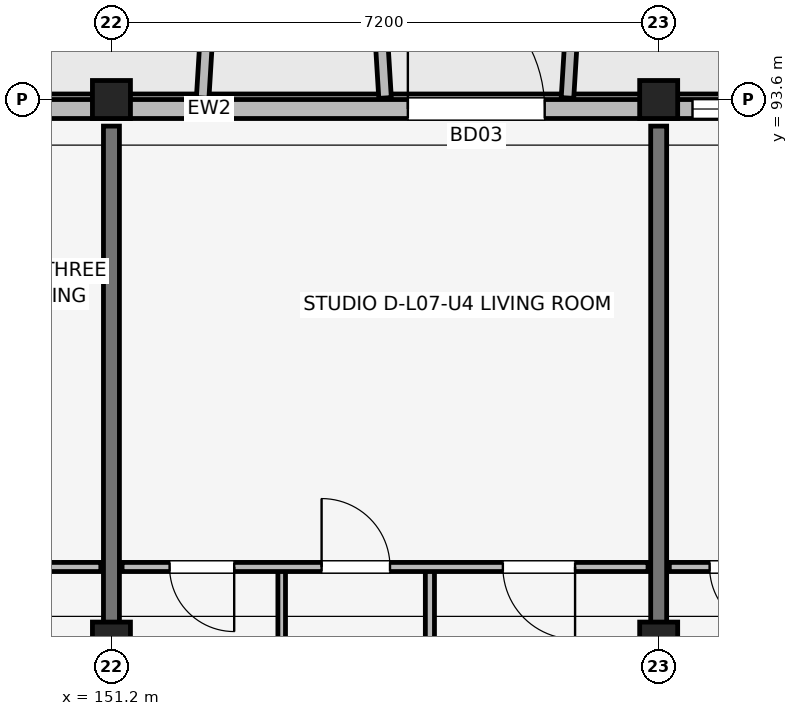
"""IFC4 building model, lengths in metres.
Left out: names, types, materials, properties, quantities, classifications, styles, units other than length and angle.
Written with IfcOpenShell. Run it as: python <this file> out.ifc"""

import sys

from ifc_helpers import new_model, si_unit, direction, frame, frame_2d, origin, origin_2d, place, context, subcontext, project, spatial, rectangle, extrude, element, fill, save


model = new_model("IFC4")
c1 = context("Model", 3, precision=1e-05, world=origin(), true_north=direction((0.0, 1.0)))
c2 = subcontext(c1, "Body", "Model", "MODEL_VIEW")
j1 = project(units=[si_unit("LENGTHUNIT", "METRE"), si_unit("PLANEANGLEUNIT", "RADIAN")], contexts=[c1])
p1 = place(None, origin())
s1 = spatial("IfcSite", under=j1, at=p1, CompositionType="ELEMENT")
p2 = place(p1, origin())
s2 = spatial("IfcBuilding", under=s1, at=p2, CompositionType="ELEMENT")
p3 = place(p2, frame((0.0, 0.0, 24.45)))
s3 = spatial("IfcBuildingStorey", under=s2, at=p3, CompositionType="ELEMENT", Elevation=24.45)
p4 = place(p3, frame((151.2, 86.4, 0.0), z_axis=(0.0, 0.0, 1.0), x_axis=(1.0, 0.0, 0.0)))
e1 = element("IfcColumn", 1, at=p4, inside=s3, PredefinedType="COLUMN", context=c2, shape_type="SweptSolid", body=[
    extrude(rectangle(XDim=0.5, YDim=0.65, at=origin_2d()), origin(), (0.0, 0.0, 1.0), 3.15),
])
p5 = place(p3, frame((151.2, 93.6, 0.0), z_axis=(0.0, 0.0, 1.0), x_axis=(1.0, 0.0, 0.0)))
e2 = element("IfcColumn", 2, at=p5, inside=s3, PredefinedType="COLUMN", context=c2, shape_type="SweptSolid", body=[
    extrude(rectangle(XDim=0.5, YDim=0.5, at=origin_2d()), origin(), (0.0, 0.0, 1.0), 3.15),
])
p6 = place(p3, frame((158.4, 86.4, 0.0), z_axis=(0.0, 0.0, 1.0), x_axis=(1.0, 0.0, 0.0)))
e3 = element("IfcColumn", 3, at=p6, inside=s3, PredefinedType="COLUMN", context=c2, shape_type="SweptSolid", body=[
    extrude(rectangle(XDim=0.5, YDim=0.65, at=origin_2d()), origin(), (0.0, 0.0, 1.0), 3.15),
])
p7 = place(p3, frame((158.4, 93.6, 0.0), z_axis=(0.0, 0.0, 1.0), x_axis=(1.0, 0.0, 0.0)))
e4 = element("IfcColumn", 4, at=p7, inside=s3, PredefinedType="COLUMN", context=c2, shape_type="SweptSolid", body=[
    extrude(rectangle(XDim=0.5, YDim=0.5, at=origin_2d()), origin(), (0.0, 0.0, 1.0), 3.15),
])
for number, where, z_axis, x_axis in (
    (5, (151.2, 83.85, 0.0), (0.0, 0.0, 1.0), (0.0, 1.0, 0.0)),
    (6, (158.4, 83.85, 0.0), (0.0, 0.0, 1.0), (0.0, 1.0, 0.0)),
):
    element("IfcWall", number, at=place(p3, frame(where, z_axis=z_axis, x_axis=x_axis)), inside=s3, PredefinedType="SHEAR", context=c2, shape_type="SweptSolid", body=[
        extrude(rectangle(XDim=9.4, YDim=0.21, at=frame_2d((4.7, 0.0))), origin(), (0.0, 0.0, 1.0), 3.15),
    ])
p8 = place(p3, frame((162.8, 93.475, 0.0), z_axis=(0.0, 0.0, 1.0), x_axis=(-1.0, 0.0, 0.0)))
e7 = element("IfcWall", 7, at=p8, inside=s3, PredefinedType="SOLIDWALL", context=c2, shape_type="SweptSolid", body=[
    extrude(rectangle(XDim=30.4, YDim=0.25, at=frame_2d((15.2, 0.0))), origin(), (0.0, 0.0, 1.0), 2.43),
])
p9 = place(p8, frame((21.95, 0.0, 0.0), z_axis=(0.0, 0.0, 1.0), x_axis=(-1.0, 0.0, 0.0)))
e8 = element("IfcOpeningElement", 8, at=p9, cuts=e7, PredefinedType="OPENING", context=c2, shape_type="SweptSolid", body=[
    extrude(rectangle(XDim=1.5, YDim=2.15, at=frame_2d((0.75, 1.075))), frame((0.0, 0.135, 0.0), z_axis=(0.0, -1.0, 0.0), x_axis=(1.0, 0.0, 0.0)), (0.0, 0.0, 1.0), 0.27),
])
p10 = place(p8, frame((7.7, 0.0, 0.0), z_axis=(0.0, 0.0, 1.0), x_axis=(-1.0, 0.0, 0.0)))
e9 = element("IfcOpeningElement", 9, at=p10, cuts=e7, PredefinedType="OPENING", context=c2, shape_type="SweptSolid", body=[
    extrude(rectangle(XDim=1.8, YDim=2.15, at=frame_2d((0.9, 1.075))), frame((0.0, 0.135, 0.0), z_axis=(0.0, -1.0, 0.0), x_axis=(1.0, 0.0, 0.0)), (0.0, 0.0, 1.0), 0.27),
])
p11 = place(p8, frame((27.97, 0.0, 0.7)))
e10 = element("IfcOpeningElement", 10, at=p11, cuts=e7, PredefinedType="OPENING", context=c2, shape_type="SweptSolid", body=[
    extrude(rectangle(XDim=1.46, YDim=1.55, at=frame_2d((0.73, 0.775))), frame((0.0, 0.135, 0.0), z_axis=(0.0, -1.0, 0.0), x_axis=(1.0, 0.0, 0.0)), (0.0, 0.0, 1.0), 0.27),
])
p12 = place(p8, frame((26.445, 0.0, 0.75)))
e11 = element("IfcOpeningElement", 11, at=p12, cuts=e7, PredefinedType="OPENING", context=c2, shape_type="SweptSolid", body=[
    extrude(rectangle(XDim=0.6, YDim=1.25, at=frame_2d((0.3, 0.625))), frame((0.0, 0.135, 0.0), z_axis=(0.0, -1.0, 0.0), x_axis=(1.0, 0.0, 0.0)), (0.0, 0.0, 1.0), 0.27),
])
p13 = place(p8, frame((23.925, 0.0, 0.75)))
e12 = element("IfcOpeningElement", 12, at=p13, cuts=e7, PredefinedType="OPENING", context=c2, shape_type="SweptSolid", body=[
    extrude(rectangle(XDim=0.72, YDim=1.35, at=frame_2d((0.36, 0.675))), frame((0.0, 0.135, 0.0), z_axis=(0.0, -1.0, 0.0), x_axis=(1.0, 0.0, 0.0)), (0.0, 0.0, 1.0), 0.27),
])
p14 = place(p8, frame((16.725, 0.0, 0.75)))
e13 = element("IfcOpeningElement", 13, at=p14, cuts=e7, PredefinedType="OPENING", context=c2, shape_type="SweptSolid", body=[
    extrude(rectangle(XDim=0.72, YDim=1.35, at=frame_2d((0.36, 0.675))), frame((0.0, 0.135, 0.0), z_axis=(0.0, -1.0, 0.0), x_axis=(1.0, 0.0, 0.0)), (0.0, 0.0, 1.0), 0.27),
])
p15 = place(p8, frame((12.925, 0.0, 0.67)))
e14 = element("IfcOpeningElement", 14, at=p15, cuts=e7, PredefinedType="OPENING", context=c2, shape_type="SweptSolid", body=[
    extrude(rectangle(XDim=2.15, YDim=1.65, at=frame_2d((1.075, 0.825))), frame((0.0, 0.135, 0.0), z_axis=(0.0, -1.0, 0.0), x_axis=(1.0, 0.0, 0.0)), (0.0, 0.0, 1.0), 0.27),
])
p16 = place(p8, frame((3.355, 0.0, 0.75)))
e15 = element("IfcOpeningElement", 15, at=p16, cuts=e7, PredefinedType="OPENING", context=c2, shape_type="SweptSolid", body=[
    extrude(rectangle(XDim=0.6, YDim=1.25, at=frame_2d((0.3, 0.625))), frame((0.0, 0.135, 0.0), z_axis=(0.0, -1.0, 0.0), x_axis=(1.0, 0.0, 0.0)), (0.0, 0.0, 1.0), 0.27),
])
p17 = place(p8, frame((0.96, 0.0, 0.75)))
e16 = element("IfcOpeningElement", 16, at=p17, cuts=e7, PredefinedType="OPENING", context=c2, shape_type="SweptSolid", body=[
    extrude(rectangle(XDim=1.22, YDim=1.5, at=frame_2d((0.61, 0.75))), frame((0.0, 0.135, 0.0), z_axis=(0.0, -1.0, 0.0), x_axis=(1.0, 0.0, 0.0)), (0.0, 0.0, 1.0), 0.27),
])
for number, where, z_axis, x_axis in (
    (17, (152.4, 93.62, 0.0), (0.0, 0.0, 1.0), (0.061, 0.998, 0.0)),
    (18, (154.8, 93.62, 0.0), (0.0, 0.0, 1.0), (-0.061, 0.998, 0.0)),
    (19, (157.2, 93.62, 0.0), (0.0, 0.0, 1.0), (0.061, 0.998, 0.0)),
):
    element("IfcWall", number, at=place(p3, frame(where, z_axis=z_axis, x_axis=x_axis)), inside=s3, PredefinedType="ELEMENTEDWALL", context=c2, shape_type="SweptSolid", body=[
        extrude(rectangle(XDim=1.964, YDim=0.165, at=frame_2d((0.982, 0.0))), origin(), (0.0, 0.0, 1.0), 2.53),
    ])
p18 = place(p3, frame((144.14, 87.45, 0.0), z_axis=(0.0, 0.0, 1.0), x_axis=(1.0, 0.0, 0.0)))
e20 = element("IfcWall", 20, at=p18, inside=s3, PredefinedType="PARTITIONING", context=c2, shape_type="SweptSolid", body=[
    extrude(rectangle(XDim=6.92, YDim=0.12, at=frame_2d((3.46, 0.0))), origin(), (0.0, 0.0, 1.0), 2.38),
])
p19 = place(p18, frame((0.625, 0.0, 0.0)))
e21 = element("IfcOpeningElement", 21, at=p19, cuts=e20, PredefinedType="OPENING", context=c2, shape_type="SweptSolid", body=[
    extrude(rectangle(XDim=0.85, YDim=2.08, at=frame_2d((0.425, 1.04))), frame((0.0, 0.07, 0.0), z_axis=(0.0, -1.0, 0.0), x_axis=(1.0, 0.0, 0.0)), (0.0, 0.0, 1.0), 0.14),
])
p20 = place(p18, frame((3.675, 0.0, 0.0), z_axis=(0.0, 0.0, 1.0), x_axis=(-1.0, 0.0, 0.0)))
e22 = element("IfcOpeningElement", 22, at=p20, cuts=e20, PredefinedType="OPENING", context=c2, shape_type="SweptSolid", body=[
    extrude(rectangle(XDim=0.9, YDim=2.08, at=frame_2d((0.45, 1.04))), frame((0.0, 0.07, 0.0), z_axis=(0.0, -1.0, 0.0), x_axis=(1.0, 0.0, 0.0)), (0.0, 0.0, 1.0), 0.14),
])
p21 = place(p18, frame((5.16, 0.0, 0.0)))
e23 = element("IfcOpeningElement", 23, at=p21, cuts=e20, PredefinedType="OPENING", context=c2, shape_type="SweptSolid", body=[
    extrude(rectangle(XDim=0.95, YDim=2.08, at=frame_2d((0.475, 1.04))), frame((0.0, 0.07, 0.0), z_axis=(0.0, -1.0, 0.0), x_axis=(1.0, 0.0, 0.0)), (0.0, 0.0, 1.0), 0.14),
])
p22 = place(p3, frame((153.44, 83.7, 0.0), z_axis=(0.0, 0.0, 1.0), x_axis=(0.0, 1.0, 0.0)))
e24 = element("IfcWall", 24, at=p22, inside=s3, PredefinedType="PARTITIONING", context=c2, shape_type="SweptSolid", body=[
    extrude(rectangle(XDim=3.75, YDim=0.1, at=frame_2d((1.875, 0.0))), origin(), (0.0, 0.0, 1.0), 2.38),
])
p23 = place(p3, frame((155.39, 83.7, 0.0), z_axis=(0.0, 0.0, 1.0), x_axis=(0.0, 1.0, 0.0)))
e25 = element("IfcWall", 25, at=p23, inside=s3, PredefinedType="PARTITIONING", context=c2, shape_type="SweptSolid", body=[
    extrude(rectangle(XDim=3.75, YDim=0.12, at=frame_2d((1.875, 0.0))), origin(), (0.0, 0.0, 1.0), 2.38),
])
p24 = place(p3, frame((151.34, 87.45, 0.0), z_axis=(0.0, 0.0, 1.0), x_axis=(1.0, 0.0, 0.0)))
e26 = element("IfcWall", 26, at=p24, inside=s3, PredefinedType="PARTITIONING", context=c2, shape_type="SweptSolid", body=[
    extrude(rectangle(XDim=6.92, YDim=0.12, at=frame_2d((3.46, 0.0))), origin(), (0.0, 0.0, 1.0), 2.38),
])
p25 = place(p24, frame((1.475, 0.0, 0.0), z_axis=(0.0, 0.0, 1.0), x_axis=(-1.0, 0.0, 0.0)))
e27 = element("IfcOpeningElement", 27, at=p25, cuts=e26, PredefinedType="OPENING", context=c2, shape_type="SweptSolid", body=[
    extrude(rectangle(XDim=0.85, YDim=2.08, at=frame_2d((0.425, 1.04))), frame((0.0, 0.07, 0.0), z_axis=(0.0, -1.0, 0.0), x_axis=(1.0, 0.0, 0.0)), (0.0, 0.0, 1.0), 0.14),
])
p26 = place(p24, frame((2.625, 0.0, 0.0)))
e28 = element("IfcOpeningElement", 28, at=p26, cuts=e26, PredefinedType="OPENING", context=c2, shape_type="SweptSolid", body=[
    extrude(rectangle(XDim=0.9, YDim=2.08, at=frame_2d((0.45, 1.04))), frame((0.0, 0.07, 0.0), z_axis=(0.0, -1.0, 0.0), x_axis=(1.0, 0.0, 0.0)), (0.0, 0.0, 1.0), 0.14),
])
p27 = place(p24, frame((5.96, 0.0, 0.0), z_axis=(0.0, 0.0, 1.0), x_axis=(-1.0, 0.0, 0.0)))
e29 = element("IfcOpeningElement", 29, at=p27, cuts=e26, PredefinedType="OPENING", context=c2, shape_type="SweptSolid", body=[
    extrude(rectangle(XDim=0.95, YDim=2.08, at=frame_2d((0.475, 1.04))), frame((0.0, 0.07, 0.0), z_axis=(0.0, -1.0, 0.0), x_axis=(1.0, 0.0, 0.0)), (0.0, 0.0, 1.0), 0.14),
])
p28 = place(p3, frame((158.54, 87.45, 0.0), z_axis=(0.0, 0.0, 1.0), x_axis=(1.0, 0.0, 0.0)))
e30 = element("IfcWall", 30, at=p28, inside=s3, PredefinedType="PARTITIONING", context=c2, shape_type="SweptSolid", body=[
    extrude(rectangle(XDim=6.92, YDim=0.12, at=frame_2d((3.46, 0.0))), origin(), (0.0, 0.0, 1.0), 2.38),
])
p29 = place(p28, frame((1.38, 0.0, 0.0), z_axis=(0.0, 0.0, 1.0), x_axis=(-1.0, 0.0, 0.0)))
e31 = element("IfcOpeningElement", 31, at=p29, cuts=e30, PredefinedType="OPENING", context=c2, shape_type="SweptSolid", body=[
    extrude(rectangle(XDim=0.85, YDim=2.08, at=frame_2d((0.425, 1.04))), frame((0.0, 0.07, 0.0), z_axis=(0.0, -1.0, 0.0), x_axis=(1.0, 0.0, 0.0)), (0.0, 0.0, 1.0), 0.14),
])
p30 = place(p28, frame((2.285, 0.0, 0.0)))
e32 = element("IfcOpeningElement", 32, at=p30, cuts=e30, PredefinedType="OPENING", context=c2, shape_type="SweptSolid", body=[
    extrude(rectangle(XDim=0.9, YDim=2.08, at=frame_2d((0.45, 1.04))), frame((0.0, 0.07, 0.0), z_axis=(0.0, -1.0, 0.0), x_axis=(1.0, 0.0, 0.0)), (0.0, 0.0, 1.0), 0.14),
])
p31 = place(p28, frame((4.86, 0.0, 0.0), z_axis=(0.0, 0.0, 1.0), x_axis=(-1.0, 0.0, 0.0)))
e33 = element("IfcOpeningElement", 33, at=p31, cuts=e30, PredefinedType="OPENING", context=c2, shape_type="SweptSolid", body=[
    extrude(rectangle(XDim=0.95, YDim=2.08, at=frame_2d((0.475, 1.04))), frame((0.0, 0.07, 0.0), z_axis=(0.0, -1.0, 0.0), x_axis=(1.0, 0.0, 0.0)), (0.0, 0.0, 1.0), 0.14),
])
p32 = place(p10, origin())
e34 = element("IfcDoor", 34, at=p32, inside=s3, OperationType="SINGLE_SWING_RIGHT", PredefinedType="DOOR", context=c2, shape_type="SweptSolid", body=[
    extrude(rectangle(XDim=1.8, YDim=2.15, at=frame_2d((0.9, 1.075))), frame((0.0, 0.025, 0.0), z_axis=(0.0, -1.0, 0.0), x_axis=(1.0, 0.0, 0.0)), (0.0, 0.0, 1.0), 0.05),
])
fill(e9, e34)
p33 = place(p16, origin())
e35 = element("IfcWindow", 35, at=p33, inside=s3, PartitioningType="SINGLE_PANEL", PredefinedType="WINDOW", context=c2, shape_type="SweptSolid", body=[
    extrude(rectangle(XDim=0.6, YDim=1.25, at=frame_2d((0.3, 0.625))), frame((0.0, 0.03, 0.0), z_axis=(0.0, -1.0, 0.0), x_axis=(1.0, 0.0, 0.0)), (0.0, 0.0, 1.0), 0.06),
])
fill(e15, e35)
p34 = place(p25, origin())
e36 = element("IfcDoor", 36, at=p34, inside=s3, OperationType="SINGLE_SWING_RIGHT", PredefinedType="DOOR", context=c2, shape_type="SweptSolid", body=[
    extrude(rectangle(XDim=0.85, YDim=2.08, at=frame_2d((0.425, 1.04))), frame((0.0, 0.025, 0.0), z_axis=(0.0, -1.0, 0.0), x_axis=(1.0, 0.0, 0.0)), (0.0, 0.0, 1.0), 0.05),
])
fill(e27, e36)
p35 = place(p26, origin())
e37 = element("IfcDoor", 37, at=p35, inside=s3, OperationType="SINGLE_SWING_LEFT", PredefinedType="DOOR", context=c2, shape_type="SweptSolid", body=[
    extrude(rectangle(XDim=0.9, YDim=2.08, at=frame_2d((0.45, 1.04))), frame((0.0, 0.025, 0.0), z_axis=(0.0, -1.0, 0.0), x_axis=(1.0, 0.0, 0.0)), (0.0, 0.0, 1.0), 0.05),
])
fill(e28, e37)
p36 = place(p27, origin())
e38 = element("IfcDoor", 38, at=p36, inside=s3, OperationType="SINGLE_SWING_RIGHT", PredefinedType="DOOR", context=c2, shape_type="SweptSolid", body=[
    extrude(rectangle(XDim=0.95, YDim=2.08, at=frame_2d((0.475, 1.04))), frame((0.0, 0.025, 0.0), z_axis=(0.0, -1.0, 0.0), x_axis=(1.0, 0.0, 0.0)), (0.0, 0.0, 1.0), 0.05),
])
fill(e29, e38)
p37 = place(p29, origin())
e39 = element("IfcDoor", 39, at=p37, inside=s3, OperationType="SINGLE_SWING_RIGHT", PredefinedType="DOOR", context=c2, shape_type="SweptSolid", body=[
    extrude(rectangle(XDim=0.85, YDim=2.08, at=frame_2d((0.425, 1.04))), frame((0.0, 0.025, 0.0), z_axis=(0.0, -1.0, 0.0), x_axis=(1.0, 0.0, 0.0)), (0.0, 0.0, 1.0), 0.05),
])
fill(e31, e39)
save(model, sys.argv[1])
